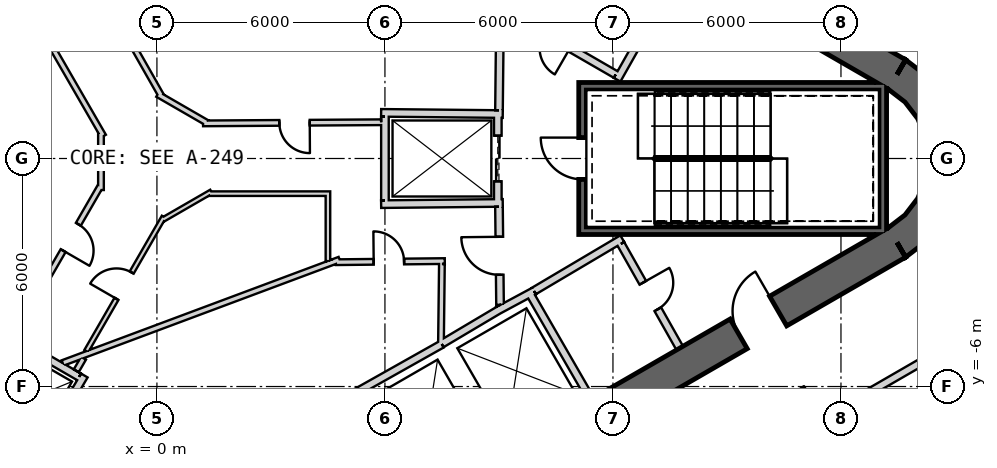
"""IFC4 building model, lengths in metres.
Left out: names, types, materials, properties, quantities, classifications, styles, units other than length and angle.
Written with IfcOpenShell. Run it as: python <this file> out.ifc"""

import sys

from ifc_helpers import new_model, si_unit, direction, frame, frame_2d, origin, place, context, subcontext, project, spatial, polyline, rectangle, outline, extrude, element, fill, save


model = new_model("IFC4")
c1 = context("Model", 3, precision=1e-05, world=origin(), true_north=direction((0.0, 1.0)))
c2 = subcontext(c1, "Body", "Model", "MODEL_VIEW")
j1 = project(units=[si_unit("LENGTHUNIT", "METRE"), si_unit("PLANEANGLEUNIT", "RADIAN")], contexts=[c1])
p1 = place(None, origin())
s1 = spatial("IfcSite", under=j1, at=p1, CompositionType="ELEMENT")
p2 = place(p1, origin())
s2 = spatial("IfcBuilding", under=s1, at=p2, CompositionType="ELEMENT")
p3 = place(p2, frame((0.0, 0.0, 404.8)))
s3 = spatial("IfcBuildingStorey", under=s2, at=p3, CompositionType="ELEMENT", Elevation=404.8)
p4 = place(p3, frame((19.475, 2.208, 0.0), z_axis=(0.0, 0.0, 1.0), x_axis=(-0.866028369851, 0.499994862586, 0.0)))
e1 = element("IfcWall", 1, at=p4, inside=s3, PredefinedType="SHEAR", context=c2, shape_type="SweptSolid", body=[
    extrude(rectangle(XDim=31.523, YDim=0.9, at=frame_2d((15.762, 0.0))), origin(), (0.0, 0.0, 1.0), 5.5),
])
p5 = place(p4, frame((3.612, 0.0, 0.0)))
e2 = element("IfcOpeningElement", 2, at=p5, cuts=e1, PredefinedType="OPENING", context=c2, shape_type="SweptSolid", body=[
    extrude(rectangle(XDim=1.2, YDim=2.4, at=frame_2d((0.6, 1.2))), frame((0.0, 0.46, 0.0), z_axis=(0.0, -1.0, 0.0), x_axis=(1.0, 0.0, 0.0)), (0.0, 0.0, 1.0), 0.92),
])
p6 = place(p4, frame((26.712, 0.0, 0.0)))
e3 = element("IfcOpeningElement", 3, at=p6, cuts=e1, PredefinedType="OPENING", context=c2, shape_type="SweptSolid", body=[
    extrude(rectangle(XDim=1.2, YDim=2.4, at=frame_2d((0.6, 1.2))), frame((0.0, 0.46, 0.0), z_axis=(0.0, -1.0, 0.0), x_axis=(1.0, 0.0, 0.0)), (0.0, 0.0, 1.0), 0.92),
])
p7 = place(p3, frame((-7.825, -17.97, 0.0), z_axis=(0.0, 0.0, 1.0), x_axis=(0.866028369851, 0.499994862586, 0.0)))
e4 = element("IfcWall", 4, at=p7, inside=s3, PredefinedType="SHEAR", context=c2, shape_type="SweptSolid", body=[
    extrude(rectangle(XDim=31.523, YDim=0.9, at=frame_2d((15.762, 0.0))), origin(), (0.0, 0.0, 1.0), 5.5),
])
p8 = place(p7, frame((7.062, 0.0, 0.0)))
e5 = element("IfcOpeningElement", 5, at=p8, cuts=e4, PredefinedType="OPENING", context=c2, shape_type="SweptSolid", body=[
    extrude(rectangle(XDim=1.2, YDim=2.4, at=frame_2d((0.6, 1.2))), frame((0.0, 0.46, 0.0), z_axis=(0.0, -1.0, 0.0), x_axis=(1.0, 0.0, 0.0)), (0.0, 0.0, 1.0), 0.92),
])
p9 = place(p7, frame((9.762, 0.0, 0.0)))
e6 = element("IfcOpeningElement", 6, at=p9, cuts=e4, PredefinedType="OPENING", context=c2, shape_type="SweptSolid", body=[
    extrude(rectangle(XDim=1.2, YDim=2.4, at=frame_2d((0.6, 1.2))), frame((0.0, 0.46, 0.0), z_axis=(0.0, -1.0, 0.0), x_axis=(1.0, 0.0, 0.0)), (0.0, 0.0, 1.0), 0.92),
])
p10 = place(p7, frame((17.862, 0.0, 0.0)))
e7 = element("IfcOpeningElement", 7, at=p10, cuts=e4, PredefinedType="OPENING", context=c2, shape_type="SweptSolid", body=[
    extrude(rectangle(XDim=1.2, YDim=2.4, at=frame_2d((0.6, 1.2))), frame((0.0, 0.46, 0.0), z_axis=(0.0, -1.0, 0.0), x_axis=(1.0, 0.0, 0.0)), (0.0, 0.0, 1.0), 0.92),
])
p11 = place(p7, frame((20.562, 0.0, 0.0)))
e8 = element("IfcOpeningElement", 8, at=p11, cuts=e4, PredefinedType="OPENING", context=c2, shape_type="SweptSolid", body=[
    extrude(rectangle(XDim=1.2, YDim=2.4, at=frame_2d((0.6, 1.2))), frame((0.0, 0.46, 0.0), z_axis=(0.0, -1.0, 0.0), x_axis=(1.0, 0.0, 0.0)), (0.0, 0.0, 1.0), 0.92),
])
p12 = place(p7, frame((26.712, 0.0, 0.0)))
e9 = element("IfcOpeningElement", 9, at=p12, cuts=e4, PredefinedType="OPENING", context=c2, shape_type="SweptSolid", body=[
    extrude(rectangle(XDim=1.2, YDim=2.4, at=frame_2d((0.6, 1.2))), frame((0.0, 0.46, 0.0), z_axis=(0.0, -1.0, 0.0), x_axis=(1.0, 0.0, 0.0)), (0.0, 0.0, 1.0), 0.92),
])
p13 = place(p7, frame((3.612, 0.0, 0.0)))
e10 = element("IfcOpeningElement", 10, at=p13, cuts=e4, PredefinedType="OPENING", context=c2, shape_type="SweptSolid", body=[
    extrude(rectangle(XDim=1.2, YDim=2.4, at=frame_2d((0.6, 1.2))), frame((0.0, 0.46, 0.0), z_axis=(0.0, -1.0, 0.0), x_axis=(1.0, 0.0, 0.0)), (0.0, 0.0, 1.0), 0.92),
])
p14 = place(p3, origin())
e11 = element("IfcWall", 11, at=p14, inside=s3, PredefinedType="SHEAR", context=c2, shape_type="SweptSolid", body=[
    extrude(outline(polyline([(19.7, -2.598), (20.321, -2.121), (20.798, -1.5), (21.098, -0.777), (21.2, 0.0), (21.098, 0.777), (20.798, 1.5), (20.321, 2.121), (19.7, 2.598), (19.25, 1.819), (19.685, 1.485), (20.019, 1.05), (20.229, 0.543), (20.3, 0.0), (20.229, -0.543), (20.019, -1.05), (19.685, -1.485), (19.25, -1.819), (19.7, -2.598)])), origin(), (0.0, 0.0, 1.0), 5.5),
])
p15 = place(p3, frame((5.231, -6.161, 0.0), z_axis=(0.0, 0.0, 1.0), x_axis=(0.871540428464, 0.4903236498, 0.0)))
e12 = element("IfcWall", 12, at=p15, inside=s3, PredefinedType="PLUMBINGWALL", context=c2, shape_type="SweptSolid", body=[
    extrude(rectangle(XDim=2.6, YDim=0.2, at=frame_2d((1.3, 0.0))), origin(), (0.0, 0.0, 1.0), 5.25),
])
p16 = place(p3, frame((9.795, -3.525, 0.0), z_axis=(0.0, 0.0, 1.0), x_axis=(0.499984717929, -0.866034226713, 0.0)))
e13 = element("IfcWall", 13, at=p16, inside=s3, PredefinedType="PLUMBINGWALL", context=c2, shape_type="SweptSolid", body=[
    extrude(rectangle(XDim=3.25, YDim=0.2, at=frame_2d((1.625, 0.0))), origin(), (0.0, 0.0, 1.0), 5.25),
])
p17 = place(p3, frame((8.974, -3.999, 0.0), z_axis=(0.0, 0.0, 1.0), x_axis=(0.880907015104, 0.473289373154, 0.0)))
e14 = element("IfcWall", 14, at=p17, inside=s3, PredefinedType="PLUMBINGWALL", context=c2, shape_type="SweptSolid", body=[
    extrude(rectangle(XDim=1.078, YDim=0.2, at=frame_2d((0.539, 0.0))), origin(), (0.0, 0.0, 1.0), 5.25),
])
p18 = place(p3, frame((7.493, -4.878, 0.0), z_axis=(0.0, 0.0, 1.0), x_axis=(0.859981807212, 0.510324691999, 0.0)))
e15 = element("IfcWall", 15, at=p18, inside=s3, PredefinedType="PLUMBINGWALL", context=c2, shape_type="SweptSolid", body=[
    extrude(rectangle(XDim=1.845, YDim=0.2, at=frame_2d((0.922, 0.0))), origin(), (0.0, 0.0, 1.0), 5.25),
])
p19 = place(p3, frame((19.2, 1.9, -0.3), z_axis=(0.0, 0.0, 1.0), x_axis=(-1.0, 0.0, 0.0)))
e16 = element("IfcWall", 16, at=p19, inside=s3, PredefinedType="SHEAR", context=c2, shape_type="SweptSolid", body=[
    extrude(rectangle(XDim=8.1, YDim=0.2, at=frame_2d((4.05, 0.0))), origin(), (0.0, 0.0, 1.0), 5.55),
])
p20 = place(p3, frame((19.1, -2.0, -0.3), z_axis=(0.0, 0.0, 1.0), x_axis=(0.0, 1.0, 0.0)))
e17 = element("IfcWall", 17, at=p20, inside=s3, PredefinedType="SHEAR", context=c2, shape_type="SweptSolid", body=[
    extrude(rectangle(XDim=3.8, YDim=0.2, at=frame_2d((1.9, 0.0))), origin(), (0.0, 0.0, 1.0), 5.55),
])
p21 = place(p3, frame((11.1, -1.9, -0.3), z_axis=(0.0, 0.0, 1.0), x_axis=(1.0, 0.0, 0.0)))
e18 = element("IfcWall", 18, at=p21, inside=s3, PredefinedType="SHEAR", context=c2, shape_type="SweptSolid", body=[
    extrude(rectangle(XDim=7.9, YDim=0.2, at=frame_2d((3.95, 0.0))), origin(), (0.0, 0.0, 1.0), 5.55),
])
p22 = place(p3, frame((11.2, -1.8, -0.3), z_axis=(0.0, 0.0, 1.0), x_axis=(0.0, 1.0, 0.0)))
e19 = element("IfcWall", 19, at=p22, inside=s3, PredefinedType="SHEAR", context=c2, shape_type="SweptSolid", body=[
    extrude(rectangle(XDim=3.6, YDim=0.2, at=frame_2d((1.8, 0.0))), origin(), (0.0, 0.0, 1.0), 5.55),
])
p23 = place(p22, frame((1.25, 0.0, 0.3)))
e20 = element("IfcOpeningElement", 20, at=p23, cuts=e19, PredefinedType="OPENING", context=c2, shape_type="SweptSolid", body=[
    extrude(rectangle(XDim=1.1, YDim=2.1, at=frame_2d((0.55, 1.05))), frame((0.0, 0.11, 0.0), z_axis=(0.0, -1.0, 0.0), x_axis=(1.0, 0.0, 0.0)), (0.0, 0.0, 1.0), 0.22),
])
p24 = place(p3, frame((8.97, 1.2, 0.0), z_axis=(0.0, 0.0, 1.0), x_axis=(0.0, -1.0, 0.0)))
e21 = element("IfcWall", 21, at=p24, inside=s3, PredefinedType="PLUMBINGWALL", context=c2, shape_type="SweptSolid", body=[
    extrude(rectangle(XDim=2.4, YDim=0.2, at=frame_2d((1.2, 0.0))), origin(), (0.0, 0.0, 1.0), 5.25),
])
p25 = place(p24, frame((0.6, 0.0, 0.0)))
e22 = element("IfcOpeningElement", 22, at=p25, cuts=e21, PredefinedType="OPENING", context=c2, shape_type="SweptSolid", body=[
    extrude(rectangle(XDim=1.2, YDim=2.4, at=frame_2d((0.6, 1.2))), frame((0.0, 0.11, 0.0), z_axis=(0.0, -1.0, 0.0), x_axis=(1.0, 0.0, 0.0)), (0.0, 0.0, 1.0), 0.22),
])
p26 = place(p3, frame((6.0, -1.1, 0.0), z_axis=(0.0, 0.0, 1.0), x_axis=(0.0, 1.0, 0.0)))
e23 = element("IfcWall", 23, at=p26, inside=s3, PredefinedType="PLUMBINGWALL", context=c2, shape_type="SweptSolid", body=[
    extrude(rectangle(XDim=2.2, YDim=0.2, at=frame_2d((1.1, 0.0))), origin(), (0.0, 0.0, 1.0), 5.25),
])
for number, where, z_axis, x_axis in (
    (24, (5.9, 1.201, 0.0), (0.0, 0.0, 1.0), (1.0, -0.01, 0.0)),
    (25, (5.9, -1.201, 0.0), (0.0, 0.0, 1.0), (1.0, 0.01, 0.0)),
):
    element("IfcWall", number, at=place(p3, frame(where, z_axis=z_axis, x_axis=x_axis)), inside=s3, PredefinedType="PLUMBINGWALL", context=c2, shape_type="SweptSolid", body=[
        extrude(rectangle(XDim=3.2, YDim=0.2, at=frame_2d((1.6, 0.0))), origin(), (0.0, 0.0, 1.0), 5.25),
    ])
p27 = place(p3, frame((-3.953, -4.646, 0.0), z_axis=(0.0, 0.0, 1.0), x_axis=(0.86605622881, -0.499946605688, 0.0)))
e26 = element("IfcWall", 26, at=p27, inside=s3, PredefinedType="PLUMBINGWALL", context=c2, shape_type="SweptSolid", body=[
    extrude(rectangle(XDim=2.2, YDim=0.2, at=frame_2d((1.1, 0.0))), origin(), (0.0, 0.0, 1.0), 5.25),
])
p28 = place(p3, frame((-1.91, -5.71, 0.0), z_axis=(0.0, 0.0, 1.0), x_axis=(-0.508616218331, -0.860993346345, 0.0)))
e27 = element("IfcWall", 27, at=p28, inside=s3, PredefinedType="PLUMBINGWALL", context=c2, shape_type="SweptSolid", body=[
    extrude(rectangle(XDim=3.2, YDim=0.2, at=frame_2d((1.6, 0.0))), origin(), (0.0, 0.0, 1.0), 5.25),
])
p29 = place(p3, frame((12.11, 2.073, 0.0), z_axis=(0.0, 0.0, 1.0), x_axis=(0.49196600604, 0.870614408852, 0.0)))
e28 = element("IfcWall", 28, at=p29, inside=s3, PredefinedType="PARTITIONING", context=c2, shape_type="SweptSolid", body=[
    extrude(rectangle(XDim=3.35, YDim=0.2, at=frame_2d((1.675, 0.0))), origin(), (0.0, 0.0, 1.0), 5.25),
])
p30 = place(p3, frame((8.974, 3.999, 0.0), z_axis=(0.0, 0.0, 1.0), x_axis=(0.86601284211, -0.500021756827, 0.0)))
e29 = element("IfcWall", 29, at=p30, inside=s3, PredefinedType="PARTITIONING", context=c2, shape_type="SweptSolid", body=[
    extrude(rectangle(XDim=3.577, YDim=0.2, at=frame_2d((1.789, 0.0))), origin(), (0.0, 0.0, 1.0), 5.25),
])
p31 = place(p30, frame((1.389, 0.0, 0.0)))
e30 = element("IfcOpeningElement", 30, at=p31, cuts=e29, PredefinedType="OPENING", context=c2, shape_type="SweptSolid", body=[
    extrude(rectangle(XDim=0.8, YDim=2.1, at=frame_2d((0.4, 1.05))), frame((0.0, 0.11, 0.0), z_axis=(0.0, -1.0, 0.0), x_axis=(1.0, 0.0, 0.0)), (0.0, 0.0, 1.0), 0.22),
])
p32 = place(p3, frame((12.245, -2.109, 0.0), z_axis=(0.0, 0.0, 1.0), x_axis=(-0.860414880418, -0.509594185166, 0.0)))
e31 = element("IfcWall", 31, at=p32, inside=s3, PredefinedType="PARTITIONING", context=c2, shape_type="SweptSolid", body=[
    extrude(rectangle(XDim=2.7, YDim=0.2, at=frame_2d((1.35, 0.0))), origin(), (0.0, 0.0, 1.0), 5.25),
])
p33 = place(p3, frame((13.758, -4.99, 0.0), z_axis=(0.0, 0.0, 1.0), x_axis=(-0.491993409184, 0.87059892334, 0.0)))
e32 = element("IfcWall", 32, at=p33, inside=s3, PredefinedType="PARTITIONING", context=c2, shape_type="SweptSolid", body=[
    extrude(rectangle(XDim=3.15, YDim=0.2, at=frame_2d((1.575, 0.0))), origin(), (0.0, 0.0, 1.0), 5.25),
])
p34 = place(p33, frame((1.175, 0.0, 0.0)))
e33 = element("IfcOpeningElement", 33, at=p34, cuts=e32, PredefinedType="OPENING", context=c2, shape_type="SweptSolid", body=[
    extrude(rectangle(XDim=0.8, YDim=2.1, at=frame_2d((0.4, 1.05))), frame((0.0, 0.11, 0.0), z_axis=(0.0, -1.0, 0.0), x_axis=(1.0, 0.0, 0.0)), (0.0, 0.0, 1.0), 0.22),
])
p35 = place(p3, frame((9.001, 1.27, 0.0), z_axis=(0.0, 0.0, 1.0), x_axis=(0.010780534828, 0.999941888346, 0.0)))
e34 = element("IfcWall", 34, at=p35, inside=s3, PredefinedType="PARTITIONING", context=c2, shape_type="SweptSolid", body=[
    extrude(rectangle(XDim=2.582, YDim=0.2, at=frame_2d((1.291, 0.0))), origin(), (0.0, 0.0, 1.0), 5.25),
])
p36 = place(p3, frame((9.029, -3.851, 0.0), z_axis=(0.0, 0.0, 1.0), x_axis=(-0.010783593937, 0.99994185536, 0.0)))
e35 = element("IfcWall", 35, at=p36, inside=s3, PredefinedType="PARTITIONING", context=c2, shape_type="SweptSolid", body=[
    extrude(rectangle(XDim=2.581, YDim=0.2, at=frame_2d((1.291, 0.0))), origin(), (0.0, 0.0, 1.0), 5.25),
])
p37 = place(p36, frame((0.791, 0.0, 0.0)))
e36 = element("IfcOpeningElement", 36, at=p37, cuts=e35, PredefinedType="OPENING", context=c2, shape_type="SweptSolid", body=[
    extrude(rectangle(XDim=1.0, YDim=2.1, at=frame_2d((0.5, 1.05))), frame((0.0, 0.11, 0.0), z_axis=(0.0, -1.0, 0.0), x_axis=(1.0, 0.0, 0.0)), (0.0, 0.0, 1.0), 0.22),
])
p38 = place(p3, frame((1.214, 0.924, 0.0), z_axis=(0.0, 0.0, 1.0), x_axis=(0.999979796062, 0.006356686907, 0.0)))
e37 = element("IfcWall", 37, at=p38, inside=s3, PredefinedType="PLUMBINGWALL", context=c2, shape_type="SweptSolid", body=[
    extrude(rectangle(XDim=4.686, YDim=0.15, at=frame_2d((2.343, 0.0))), origin(), (0.0, 0.0, 1.0), 5.25),
])
p39 = place(p38, frame((2.007, 0.0, 0.0)))
e38 = element("IfcOpeningElement", 38, at=p39, cuts=e37, PredefinedType="OPENING", context=c2, shape_type="SweptSolid", body=[
    extrude(rectangle(XDim=0.8, YDim=2.1, at=frame_2d((0.4, 1.05))), frame((0.0, 0.085, 0.0), z_axis=(0.0, -1.0, 0.0), x_axis=(1.0, 0.0, 0.0)), (0.0, 0.0, 1.0), 0.17),
])
p40 = place(p3, frame((0.019, 1.689, 0.0), z_axis=(0.0, 0.0, 1.0), x_axis=(0.866047774678, -0.499961250474, 0.0)))
e39 = element("IfcWall", 39, at=p40, inside=s3, PredefinedType="PLUMBINGWALL", context=c2, shape_type="SweptSolid", body=[
    extrude(rectangle(XDim=1.504, YDim=0.15, at=frame_2d((0.752, 0.0))), origin(), (0.0, 0.0, 1.0), 5.25),
])
p41 = place(p3, frame((-2.124, 5.586, 0.0), z_axis=(0.0, 0.0, 1.0), x_axis=(0.494514430604, -0.869169418424, 0.0)))
e40 = element("IfcWall", 40, at=p41, inside=s3, PredefinedType="PLUMBINGWALL", context=c2, shape_type="SweptSolid", body=[
    extrude(rectangle(XDim=4.534, YDim=0.15, at=frame_2d((2.267, 0.0))), origin(), (0.0, 0.0, 1.0), 5.25),
])
p42 = place(p3, frame((4.807, -2.659, 0.0), z_axis=(0.0, 0.0, 1.0), x_axis=(-0.936818342118, -0.349816228714, 0.0)))
e41 = element("IfcWall", 41, at=p42, inside=s3, PredefinedType="PLUMBINGWALL", context=c2, shape_type="SweptSolid", body=[
    extrude(rectangle(XDim=7.78, YDim=0.15, at=frame_2d((3.89, 0.0))), origin(), (0.0, 0.0, 1.0), 5.25),
])
p43 = place(p3, frame((0.182, -1.535, 0.0), z_axis=(0.0, 0.0, 1.0), x_axis=(-0.499988401207, -0.866032100247, 0.0)))
e42 = element("IfcWall", 42, at=p43, inside=s3, PredefinedType="PARTITIONING", context=c2, shape_type="SweptSolid", body=[
    extrude(rectangle(XDim=4.079, YDim=0.12, at=frame_2d((2.04, 0.0))), origin(), (0.0, 0.0, 1.0), 5.25),
])
p44 = place(p43, frame((1.691, 0.0, 0.0)))
e43 = element("IfcOpeningElement", 43, at=p44, cuts=e42, PredefinedType="OPENING", context=c2, shape_type="SweptSolid", body=[
    extrude(rectangle(XDim=0.8, YDim=2.1, at=frame_2d((0.4, 1.05))), frame((0.0, 0.07, 0.0), z_axis=(0.0, -1.0, 0.0), x_axis=(1.0, 0.0, 0.0)), (0.0, 0.0, 1.0), 0.14),
])
p45 = place(p3, frame((1.432, -0.873, 0.0), z_axis=(0.0, 0.0, 1.0), x_axis=(-0.866029572143, -0.499992780121, 0.0)))
e44 = element("IfcWall", 44, at=p45, inside=s3, PredefinedType="PARTITIONING", context=c2, shape_type="SweptSolid", body=[
    extrude(rectangle(XDim=1.485, YDim=0.12, at=frame_2d((0.743, 0.0))), origin(), (0.0, 0.0, 1.0), 5.25),
])
p46 = place(p3, frame((4.56, -0.925, 0.0), z_axis=(0.0, 0.0, 1.0), x_axis=(-1.0, 0.0, 0.0)))
e45 = element("IfcWall", 45, at=p46, inside=s3, PredefinedType="PARTITIONING", context=c2, shape_type="SweptSolid", body=[
    extrude(rectangle(XDim=3.199, YDim=0.12, at=frame_2d((1.6, 0.0))), origin(), (0.0, 0.0, 1.0), 5.25),
])
p47 = place(p3, frame((4.5, -2.7, 0.0), z_axis=(0.0, 0.0, 1.0), x_axis=(0.0, 1.0, 0.0)))
e46 = element("IfcWall", 46, at=p47, inside=s3, PredefinedType="PARTITIONING", context=c2, shape_type="SweptSolid", body=[
    extrude(rectangle(XDim=1.715, YDim=0.12, at=frame_2d((0.857, 0.0))), origin(), (0.0, 0.0, 1.0), 5.25),
])
p48 = place(p3, frame((-1.932, -5.256, 0.0), z_axis=(0.0, 0.0, 1.0), x_axis=(-0.499777709171, -0.866153705422, 0.0)))
e47 = element("IfcWall", 47, at=p48, inside=s3, PredefinedType="PLUMBINGWALL", context=c2, shape_type="SweptSolid", body=[
    extrude(rectangle(XDim=0.383, YDim=0.15, at=frame_2d((0.191, 0.0))), origin(), (0.0, 0.0, 1.0), 5.25),
])
p49 = place(p3, frame((7.575, -2.699, 0.0), z_axis=(0.0, 0.0, 1.0), x_axis=(-0.999947791603, -0.010218320275, 0.0)))
e48 = element("IfcWall", 48, at=p49, inside=s3, PredefinedType="PLUMBINGWALL", context=c2, shape_type="SweptSolid", body=[
    extrude(rectangle(XDim=2.867, YDim=0.15, at=frame_2d((1.434, 0.0))), origin(), (0.0, 0.0, 1.0), 5.25),
])
p50 = place(p49, frame((1.071, 0.0, 0.0)))
e49 = element("IfcOpeningElement", 49, at=p50, cuts=e48, PredefinedType="OPENING", context=c2, shape_type="SweptSolid", body=[
    extrude(rectangle(XDim=0.8, YDim=2.1, at=frame_2d((0.4, 1.05))), frame((0.0, 0.085, 0.0), z_axis=(0.0, -1.0, 0.0), x_axis=(1.0, 0.0, 0.0)), (0.0, 0.0, 1.0), 0.17),
])
p51 = place(p3, frame((7.475, -4.865, 0.0), z_axis=(0.0, 0.0, 1.0), x_axis=(0.011682810534, 0.99993175364, 0.0)))
e50 = element("IfcWall", 50, at=p51, inside=s3, PredefinedType="PLUMBINGWALL", context=c2, shape_type="SweptSolid", body=[
    extrude(rectangle(XDim=2.09, YDim=0.15, at=frame_2d((1.045, 0.0))), origin(), (0.0, 0.0, 1.0), 5.25),
])
p52 = place(p3, frame((-1.407, 0.587, 0.0), z_axis=(0.0, 0.0, 1.0), x_axis=(-0.500029427677, 0.866008413041, 0.0)))
e51 = element("IfcWall", 51, at=p52, inside=s3, PredefinedType="PLUMBINGWALL", context=c2, shape_type="SweptSolid", body=[
    extrude(rectangle(XDim=3.213, YDim=0.15, at=frame_2d((1.606, 0.0))), origin(), (0.0, 0.0, 1.0), 5.25),
])
p53 = place(p3, frame((-1.472, -0.83, 0.0), z_axis=(0.0, 0.0, 1.0), x_axis=(0.0, 1.0, 0.0)))
e52 = element("IfcWall", 52, at=p53, inside=s3, PredefinedType="PLUMBINGWALL", context=c2, shape_type="SweptSolid", body=[
    extrude(rectangle(XDim=1.507, YDim=0.15, at=frame_2d((0.753, 0.0))), origin(), (0.0, 0.0, 1.0), 5.25),
])
p54 = place(p3, frame((-3.089, -3.5, 0.0), z_axis=(0.0, 0.0, 1.0), x_axis=(0.500025362525, 0.866010760229, 0.0)))
e53 = element("IfcWall", 53, at=p54, inside=s3, PredefinedType="PLUMBINGWALL", context=c2, shape_type="SweptSolid", body=[
    extrude(rectangle(XDim=3.209, YDim=0.15, at=frame_2d((1.604, 0.0))), origin(), (0.0, 0.0, 1.0), 5.25),
])
p55 = place(p54, frame((1.242, 0.0, 0.0)))
e54 = element("IfcOpeningElement", 54, at=p55, cuts=e53, PredefinedType="OPENING", context=c2, shape_type="SweptSolid", body=[
    extrude(rectangle(XDim=0.8, YDim=2.1, at=frame_2d((0.4, 1.05))), frame((0.0, 0.085, 0.0), z_axis=(0.0, -1.0, 0.0), x_axis=(1.0, 0.0, 0.0)), (0.0, 0.0, 1.0), 0.17),
])
p56 = place(p3, frame((12.802, -9.583, 0.0), z_axis=(0.0, 0.0, 1.0), x_axis=(0.866025905529, 0.499999130952, 0.0)))
e55 = element("IfcWall", 55, at=p56, inside=s3, PredefinedType="PARTITIONING", context=c2, shape_type="SweptSolid", body=[
    extrude(rectangle(XDim=9.904, YDim=0.2, at=frame_2d((4.952, 0.0))), origin(), (0.0, 0.0, 1.0), 5.25),
])
p57 = place(p56, frame((4.456, 0.0, 0.0)))
e56 = element("IfcOpeningElement", 56, at=p57, cuts=e55, PredefinedType="OPENING", context=c2, shape_type="SweptSolid", body=[
    extrude(rectangle(XDim=1.0, YDim=2.1, at=frame_2d((0.5, 1.05))), frame((0.0, 0.11, 0.0), z_axis=(0.0, -1.0, 0.0), x_axis=(1.0, 0.0, 0.0)), (0.0, 0.0, 1.0), 0.22),
])
p58 = place(p23, origin())
e57 = element("IfcDoor", 57, at=p58, inside=s3, OperationType="SINGLE_SWING_RIGHT", PredefinedType="USERDEFINED", context=c2, shape_type="SweptSolid", body=[
    extrude(rectangle(XDim=1.1, YDim=2.1, at=frame_2d((0.55, 1.05))), frame((0.0, 0.025, 0.0), z_axis=(0.0, -1.0, 0.0), x_axis=(1.0, 0.0, 0.0)), (0.0, 0.0, 1.0), 0.05),
])
fill(e20, e57)
p59 = place(p37, origin())
e58 = element("IfcDoor", 58, at=p59, inside=s3, OperationType="SINGLE_SWING_RIGHT", PredefinedType="USERDEFINED", context=c2, shape_type="SweptSolid", body=[
    extrude(rectangle(XDim=1.0, YDim=2.1, at=frame_2d((0.5, 1.05))), frame((0.0, 0.025, 0.0), z_axis=(0.0, -1.0, 0.0), x_axis=(1.0, 0.0, 0.0)), (0.0, 0.0, 1.0), 0.05),
])
fill(e36, e58)
p60 = place(p25, origin())
e59 = element("IfcDoor", 59, at=p60, inside=s3, OperationType="SLIDING_TO_LEFT", PredefinedType="USERDEFINED", context=c2, shape_type="SweptSolid", body=[
    extrude(rectangle(XDim=1.2, YDim=2.4, at=frame_2d((0.6, 1.2))), frame((0.0, 0.025, 0.0), z_axis=(0.0, -1.0, 0.0), x_axis=(1.0, 0.0, 0.0)), (0.0, 0.0, 1.0), 0.05),
])
fill(e22, e59)
p61 = place(p39, origin())
e60 = element("IfcDoor", 60, at=p61, inside=s3, OperationType="SINGLE_SWING_RIGHT", PredefinedType="USERDEFINED", context=c2, shape_type="SweptSolid", body=[
    extrude(rectangle(XDim=0.8, YDim=2.1, at=frame_2d((0.4, 1.05))), frame((0.0, 0.025, 0.0), z_axis=(0.0, -1.0, 0.0), x_axis=(1.0, 0.0, 0.0)), (0.0, 0.0, 1.0), 0.05),
])
fill(e38, e60)
p62 = place(p44, origin())
e61 = element("IfcDoor", 61, at=p62, inside=s3, OperationType="SINGLE_SWING_RIGHT", PredefinedType="USERDEFINED", context=c2, shape_type="SweptSolid", body=[
    extrude(rectangle(XDim=0.8, YDim=2.1, at=frame_2d((0.4, 1.05))), frame((0.0, 0.025, 0.0), z_axis=(0.0, -1.0, 0.0), x_axis=(1.0, 0.0, 0.0)), (0.0, 0.0, 1.0), 0.05),
])
fill(e43, e61)
p63 = place(p50, origin())
e62 = element("IfcDoor", 62, at=p63, inside=s3, OperationType="SINGLE_SWING_RIGHT", PredefinedType="USERDEFINED", context=c2, shape_type="SweptSolid", body=[
    extrude(rectangle(XDim=0.8, YDim=2.1, at=frame_2d((0.4, 1.05))), frame((0.0, 0.025, 0.0), z_axis=(0.0, -1.0, 0.0), x_axis=(1.0, 0.0, 0.0)), (0.0, 0.0, 1.0), 0.05),
])
fill(e49, e62)
p64 = place(p55, origin())
e63 = element("IfcDoor", 63, at=p64, inside=s3, OperationType="SINGLE_SWING_LEFT", PredefinedType="USERDEFINED", context=c2, shape_type="SweptSolid", body=[
    extrude(rectangle(XDim=0.8, YDim=2.1, at=frame_2d((0.4, 1.05))), frame((0.0, 0.025, 0.0), z_axis=(0.0, -1.0, 0.0), x_axis=(1.0, 0.0, 0.0)), (0.0, 0.0, 1.0), 0.05),
])
fill(e54, e63)
p65 = place(p34, origin())
e64 = element("IfcDoor", 64, at=p65, inside=s3, OperationType="SINGLE_SWING_RIGHT", PredefinedType="USERDEFINED", context=c2, shape_type="SweptSolid", body=[
    extrude(rectangle(XDim=0.8, YDim=2.1, at=frame_2d((0.4, 1.05))), frame((0.0, 0.025, 0.0), z_axis=(0.0, -1.0, 0.0), x_axis=(1.0, 0.0, 0.0)), (0.0, 0.0, 1.0), 0.05),
])
fill(e33, e64)
p66 = place(p12, origin())
e65 = element("IfcDoor", 65, at=p66, inside=s3, OperationType="SINGLE_SWING_RIGHT", PredefinedType="USERDEFINED", context=c2, shape_type="SweptSolid", body=[
    extrude(rectangle(XDim=1.2, YDim=2.4, at=frame_2d((0.6, 1.2))), frame((0.0, 0.025, 0.0), z_axis=(0.0, -1.0, 0.0), x_axis=(1.0, 0.0, 0.0)), (0.0, 0.0, 1.0), 0.05),
])
fill(e9, e65)
save(model, sys.argv[1])
